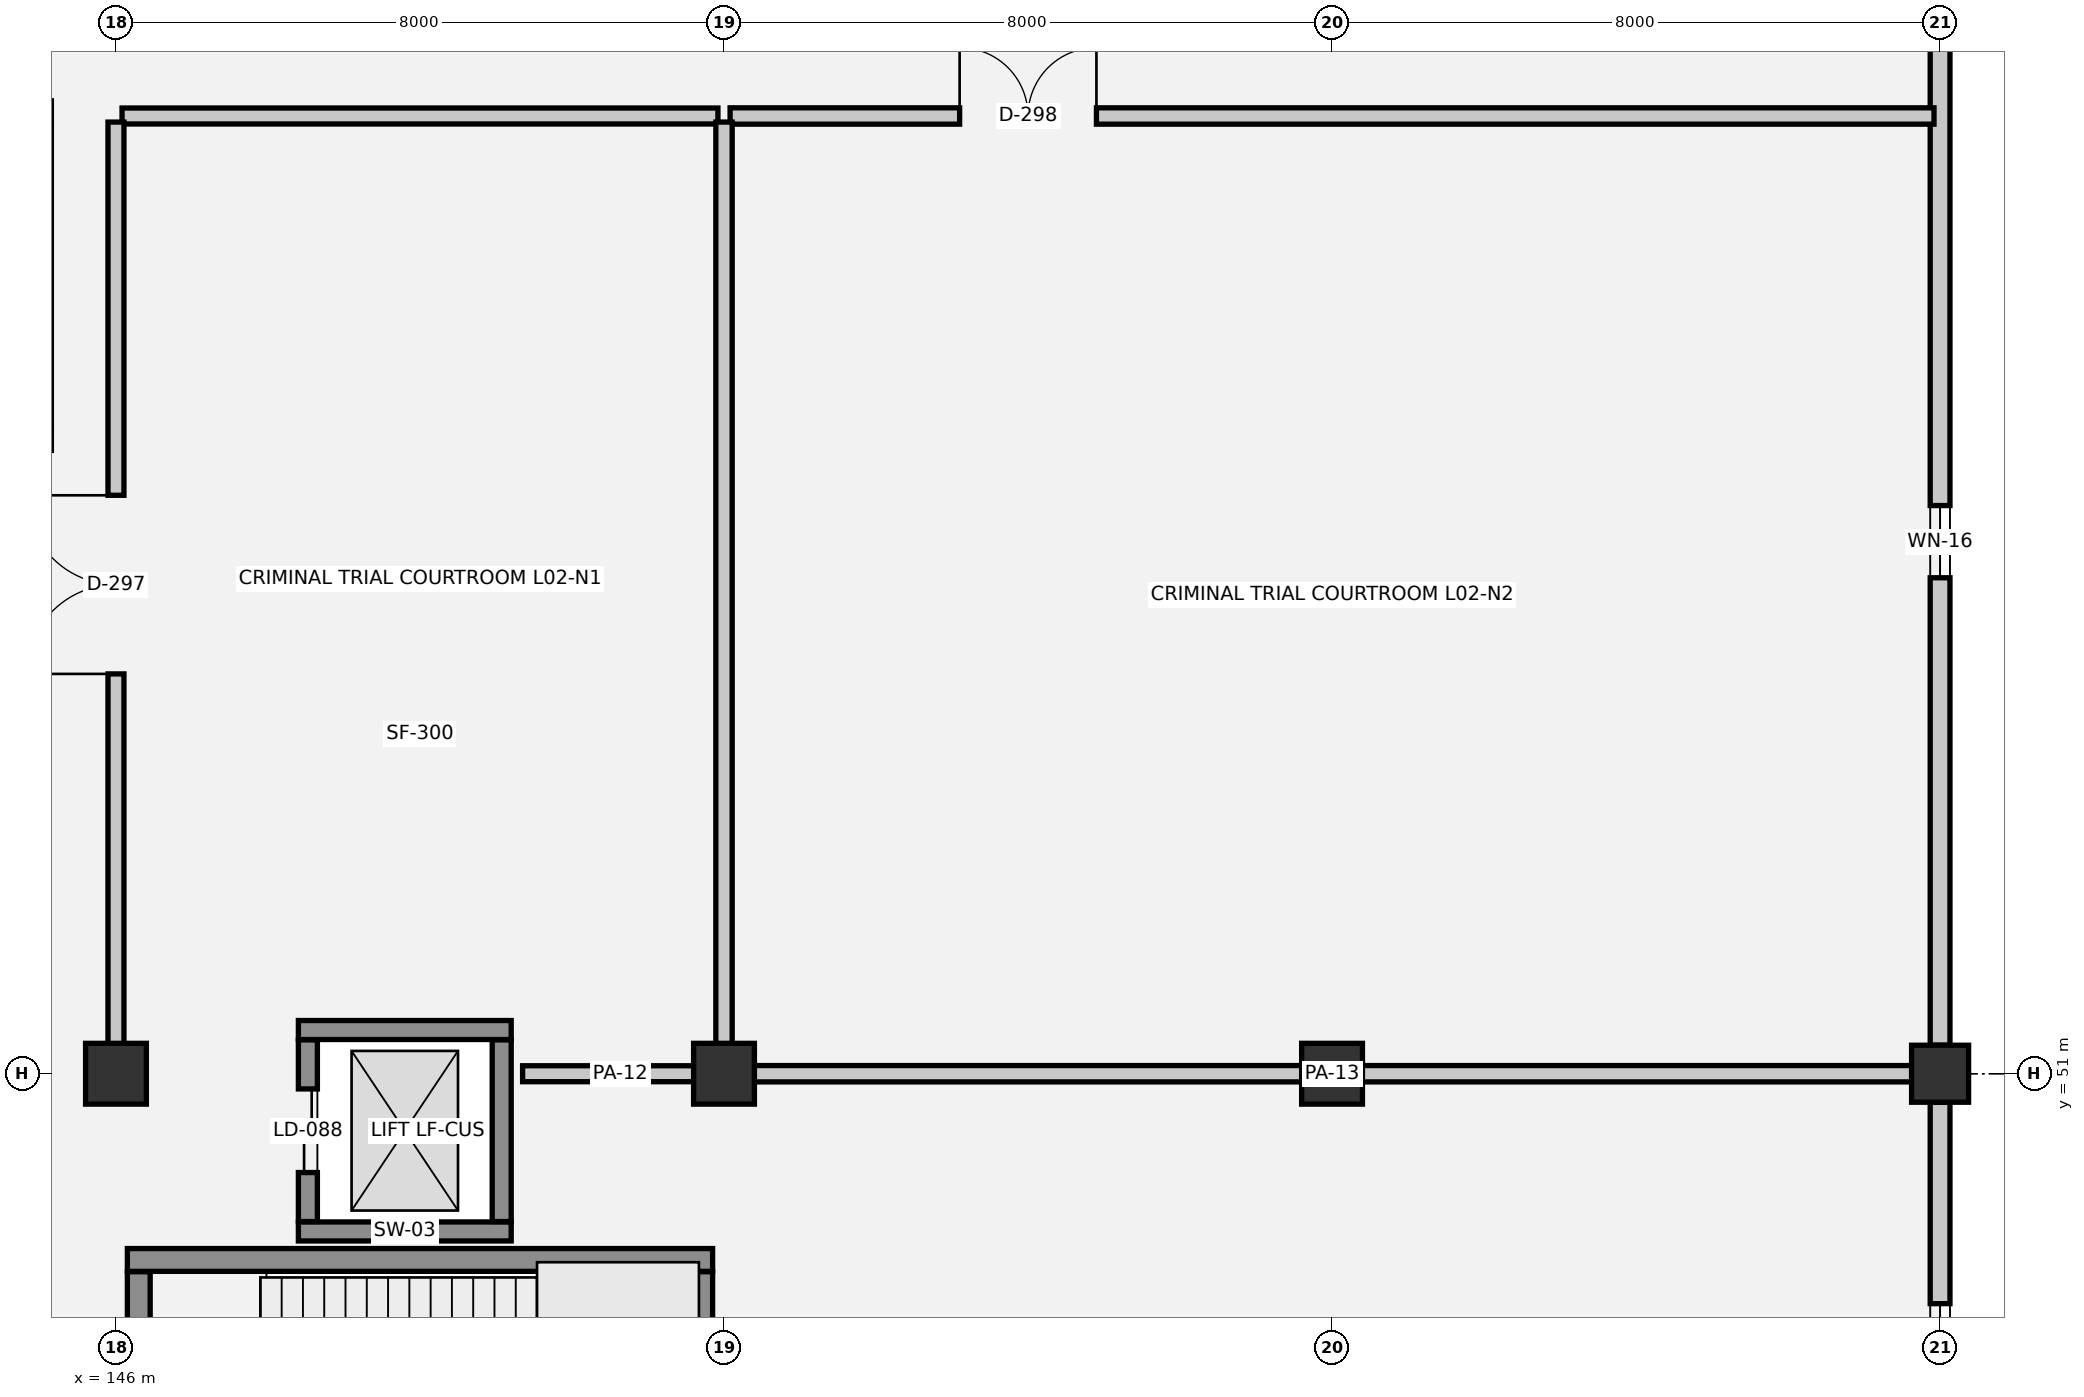
"""IFC4 building model, lengths in metres.
Left out: names, types, materials, properties, quantities, classifications, styles, units other than length and angle.
Written with IfcOpenShell. Run it as: python <this file> out.ifc"""

import sys

from ifc_helpers import new_model, si_unit, direction, frame, frame_2d, origin, origin_2d, place, context, subcontext, project, spatial, rectangle, extrude, element, fill, save


model = new_model("IFC4")
c1 = context("Model", 3, precision=1e-05, world=origin(), true_north=direction((0.0, 1.0)))
c2 = subcontext(c1, "Body", "Model", "MODEL_VIEW")
j1 = project(units=[si_unit("LENGTHUNIT", "METRE"), si_unit("PLANEANGLEUNIT", "RADIAN")], contexts=[c1])
p1 = place(None, origin())
s1 = spatial("IfcSite", under=j1, at=p1, CompositionType="ELEMENT")
p2 = place(p1, origin())
s2 = spatial("IfcBuilding", under=s1, at=p2, CompositionType="ELEMENT")
p3 = place(p2, frame((0.0, 0.0, 5.4)))
s3 = spatial("IfcBuildingStorey", under=s2, at=p3, CompositionType="ELEMENT", Elevation=5.4)
for number, where, z_axis, x_axis in (
    (1, (146.0, 51.0, 0.0), (0.0, 0.0, 1.0), (1.0, 0.0, 0.0)),
    (2, (154.0, 51.0, 0.0), (0.0, 0.0, 1.0), (1.0, 0.0, 0.0)),
    (3, (162.0, 51.0, 0.0), (0.0, 0.0, 1.0), (1.0, 0.0, 0.0)),
):
    element("IfcColumn", number, at=place(p3, frame(where, z_axis=z_axis, x_axis=x_axis)), inside=s3, PredefinedType="COLUMN", context=c2, shape_type="SweptSolid", body=[
        extrude(rectangle(XDim=0.8, YDim=0.8, at=origin_2d()), origin(), (0.0, 0.0, 1.0), 4.5),
    ])
p4 = place(p3, frame((170.0, 51.0, 0.0), z_axis=(0.0, 0.0, 1.0), x_axis=(1.0, 0.0, 0.0)))
e4 = element("IfcColumn", 4, at=p4, inside=s3, PredefinedType="COLUMN", context=c2, shape_type="SweptSolid", body=[
    extrude(rectangle(XDim=0.75, YDim=0.75, at=origin_2d()), origin(), (0.0, 0.0, 1.0), 4.5),
])
p5 = place(p3, frame((170.0, 64.625, 0.0), z_axis=(0.0, 0.0, 1.0), x_axis=(0.0, -1.0, 0.0)))
e5 = element("IfcWall", 5, at=p5, inside=s3, PredefinedType="SOLIDWALL", context=c2, shape_type="SweptSolid", body=[
    extrude(rectangle(XDim=13.25, YDim=0.26, at=frame_2d((6.625, 0.0))), origin(), (0.0, 0.0, 1.0), 3.23),
])
p6 = place(p5, frame((6.15, 0.0, 1.0)))
e6 = element("IfcOpeningElement", 6, at=p6, cuts=e5, PredefinedType="OPENING", context=c2, shape_type="SweptSolid", body=[
    extrude(rectangle(XDim=0.95, YDim=1.1, at=frame_2d((0.475, 0.55))), frame((0.0, 0.14, 0.0), z_axis=(0.0, -1.0, 0.0), x_axis=(1.0, 0.0, 0.0)), (0.0, 0.0, 1.0), 0.28),
])
p7 = place(p3, frame((170.0, 50.625, 0.0), z_axis=(0.0, 0.0, 1.0), x_axis=(0.0, -1.0, 0.0)))
e7 = element("IfcWall", 7, at=p7, inside=s3, PredefinedType="SOLIDWALL", context=c2, shape_type="SweptSolid", body=[
    extrude(rectangle(XDim=6.25, YDim=0.26, at=frame_2d((3.125, 0.0))), origin(), (0.0, 0.0, 1.0), 3.23),
])
p8 = place(p7, frame((2.65, 0.0, 1.0)))
e8 = element("IfcOpeningElement", 8, at=p8, cuts=e7, PredefinedType="OPENING", context=c2, shape_type="SweptSolid", body=[
    extrude(rectangle(XDim=0.95, YDim=1.1, at=frame_2d((0.475, 0.55))), frame((0.0, 0.14, 0.0), z_axis=(0.0, -1.0, 0.0), x_axis=(1.0, 0.0, 0.0)), (0.0, 0.0, 1.0), 0.28),
])
for number, where, z_axis, x_axis in (
    (9, (148.4, 48.925, 0.0), (0.0, 0.0, 1.0), (1.0, 0.0, 0.0)),
    (10, (151.2, 51.575, 0.0), (0.0, 0.0, 1.0), (-1.0, 0.0, 0.0)),
):
    element("IfcWall", number, at=place(p3, frame(where, z_axis=z_axis, x_axis=x_axis)), inside=s3, PredefinedType="SHEAR", context=c2, shape_type="SweptSolid", body=[
        extrude(rectangle(XDim=2.8, YDim=0.25, at=frame_2d((1.4, 0.0))), origin(), (0.0, 0.0, 1.0), 4.5),
    ])
p9 = place(p3, frame((148.525, 51.445, 0.0), z_axis=(0.0, 0.0, 1.0), x_axis=(0.0, -1.0, 0.0)))
e11 = element("IfcWall", 11, at=p9, inside=s3, PredefinedType="SHEAR", context=c2, shape_type="SweptSolid", body=[
    extrude(rectangle(XDim=2.39, YDim=0.25, at=frame_2d((1.195, 0.0))), origin(), (0.0, 0.0, 1.0), 4.5),
])
p10 = place(p9, frame((0.645, 0.0, 0.0)))
e12 = element("IfcOpeningElement", 12, at=p10, cuts=e11, PredefinedType="OPENING", context=c2, shape_type="SweptSolid", body=[
    extrude(rectangle(XDim=1.1, YDim=2.15, at=frame_2d((0.55, 1.075))), frame((0.0, 0.135, 0.0), z_axis=(0.0, -1.0, 0.0), x_axis=(1.0, 0.0, 0.0)), (0.0, 0.0, 1.0), 0.27),
])
p11 = place(p3, frame((151.075, 49.055, 0.0), z_axis=(0.0, 0.0, 1.0), x_axis=(0.0, 1.0, 0.0)))
e13 = element("IfcWall", 13, at=p11, inside=s3, PredefinedType="SHEAR", context=c2, shape_type="SweptSolid", body=[
    extrude(rectangle(XDim=2.39, YDim=0.25, at=frame_2d((1.195, 0.0))), origin(), (0.0, 0.0, 1.0), 4.5),
])
p12 = place(p3, frame((153.85, 48.55, 0.0), z_axis=(0.0, 0.0, 1.0), x_axis=(-1.0, 0.0, 0.0)))
e14 = element("IfcWall", 14, at=p12, inside=s3, PredefinedType="SHEAR", context=c2, shape_type="SweptSolid", body=[
    extrude(rectangle(XDim=7.7, YDim=0.3, at=frame_2d((3.85, 0.0))), origin(), (0.0, 0.0, 1.0), 4.2),
])
p13 = place(p3, frame((146.3, 48.395, 0.0), z_axis=(0.0, 0.0, 1.0), x_axis=(0.0, -1.0, 0.0)))
e15 = element("IfcWall", 15, at=p13, inside=s3, PredefinedType="SHEAR", context=c2, shape_type="SweptSolid", body=[
    extrude(rectangle(XDim=3.99, YDim=0.3, at=frame_2d((1.995, 0.0))), origin(), (0.0, 0.0, 1.0), 4.2),
])
p14 = place(p13, frame((1.37, 0.0, 0.0)))
e16 = element("IfcOpeningElement", 16, at=p14, cuts=e15, PredefinedType="OPENING", context=c2, shape_type="SweptSolid", body=[
    extrude(rectangle(XDim=1.25, YDim=2.15, at=frame_2d((0.625, 1.075))), frame((0.0, 0.16, 0.0), z_axis=(0.0, -1.0, 0.0), x_axis=(1.0, 0.0, 0.0)), (0.0, 0.0, 1.0), 0.32),
])
p15 = place(p3, frame((153.7, 44.405, 0.0), z_axis=(0.0, 0.0, 1.0), x_axis=(0.0, 1.0, 0.0)))
e17 = element("IfcWall", 17, at=p15, inside=s3, PredefinedType="SHEAR", context=c2, shape_type="SweptSolid", body=[
    extrude(rectangle(XDim=3.99, YDim=0.3, at=frame_2d((1.995, 0.0))), origin(), (0.0, 0.0, 1.0), 4.2),
])
p16 = place(p3, frame((151.35, 51.0, 0.0), z_axis=(0.0, 0.0, 1.0), x_axis=(1.0, 0.0, 0.0)))
e18 = element("IfcWall", 18, at=p16, inside=s3, PredefinedType="PARTITIONING", context=c2, shape_type="SweptSolid", body=[
    extrude(rectangle(XDim=2.57, YDim=0.21, at=frame_2d((1.285, 0.0))), origin(), (0.0, 0.0, 1.0), 3.45),
])
p17 = place(p3, frame((154.08, 51.0, 0.0), z_axis=(0.0, 0.0, 1.0), x_axis=(1.0, 0.0, 0.0)))
e19 = element("IfcWall", 19, at=p17, inside=s3, PredefinedType="PARTITIONING", context=c2, shape_type="SweptSolid", body=[
    extrude(rectangle(XDim=15.84, YDim=0.215, at=frame_2d((7.92, 0.0))), origin(), (0.0, 0.0, 1.0), 3.45),
])
p18 = place(p3, frame((146.08, 63.6, 0.0), z_axis=(0.0, 0.0, 1.0), x_axis=(1.0, 0.0, 0.0)))
e20 = element("IfcWall", 20, at=p18, inside=s3, PredefinedType="PARTITIONING", context=c2, shape_type="SweptSolid", body=[
    extrude(rectangle(XDim=7.84, YDim=0.21, at=frame_2d((3.92, 0.0))), origin(), (0.0, 0.0, 1.0), 4.14),
])
p19 = place(p3, frame((154.08, 63.6, 0.0), z_axis=(0.0, 0.0, 1.0), x_axis=(1.0, 0.0, 0.0)))
e21 = element("IfcWall", 21, at=p19, inside=s3, PredefinedType="PARTITIONING", context=c2, shape_type="SweptSolid", body=[
    extrude(rectangle(XDim=15.84, YDim=0.215, at=frame_2d((7.92, 0.0))), origin(), (0.0, 0.0, 1.0), 4.14),
])
p20 = place(p19, frame((3.02, 0.0, 0.0)))
e22 = element("IfcOpeningElement", 22, at=p20, cuts=e21, PredefinedType="OPENING", context=c2, shape_type="SweptSolid", body=[
    extrude(rectangle(XDim=1.8, YDim=2.3, at=frame_2d((0.9, 1.15))), frame((0.0, 0.117, 0.0), z_axis=(0.0, -1.0, 0.0), x_axis=(1.0, 0.0, 0.0)), (0.0, 0.0, 1.0), 0.235),
])
p21 = place(p3, frame((146.0, 51.35, 0.0), z_axis=(0.0, 0.0, 1.0), x_axis=(0.0, 1.0, 0.0)))
e23 = element("IfcWall", 23, at=p21, inside=s3, PredefinedType="PARTITIONING", context=c2, shape_type="SweptSolid", body=[
    extrude(rectangle(XDim=12.17, YDim=0.21, at=frame_2d((6.085, 0.0))), origin(), (0.0, 0.0, 1.0), 3.25),
])
p22 = place(p21, frame((4.91, 0.0, 0.0)))
e24 = element("IfcOpeningElement", 24, at=p22, cuts=e23, PredefinedType="OPENING", context=c2, shape_type="SweptSolid", body=[
    extrude(rectangle(XDim=2.35, YDim=2.4, at=frame_2d((1.175, 1.2))), frame((0.0, 0.115, 0.0), z_axis=(0.0, -1.0, 0.0), x_axis=(1.0, 0.0, 0.0)), (0.0, 0.0, 1.0), 0.23),
])
p23 = place(p3, frame((154.0, 51.08, 0.0), z_axis=(0.0, 0.0, 1.0), x_axis=(0.0, 1.0, 0.0)))
e25 = element("IfcWall", 25, at=p23, inside=s3, PredefinedType="PARTITIONING", context=c2, shape_type="SweptSolid", body=[
    extrude(rectangle(XDim=12.44, YDim=0.215, at=frame_2d((6.22, 0.0))), origin(), (0.0, 0.0, 1.0), 3.25),
])
p24 = place(p6, origin())
e26 = element("IfcWindow", 26, at=p24, inside=s3, PartitioningType="SINGLE_PANEL", PredefinedType="WINDOW", context=c2, shape_type="SweptSolid", body=[
    extrude(rectangle(XDim=0.95, YDim=1.1, at=frame_2d((0.475, 0.55))), frame((0.0, 0.03, 0.0), z_axis=(0.0, -1.0, 0.0), x_axis=(1.0, 0.0, 0.0)), (0.0, 0.0, 1.0), 0.06),
])
fill(e6, e26)
p25 = place(p8, origin())
e27 = element("IfcWindow", 27, at=p25, inside=s3, PartitioningType="SINGLE_PANEL", PredefinedType="WINDOW", context=c2, shape_type="SweptSolid", body=[
    extrude(rectangle(XDim=0.95, YDim=1.1, at=frame_2d((0.475, 0.55))), frame((0.0, 0.03, 0.0), z_axis=(0.0, -1.0, 0.0), x_axis=(1.0, 0.0, 0.0)), (0.0, 0.0, 1.0), 0.06),
])
fill(e8, e27)
p26 = place(p10, origin())
e28 = element("IfcDoor", 28, at=p26, inside=s3, OperationType="DOUBLE_DOOR_SLIDING", PredefinedType="DOOR", context=c2, shape_type="SweptSolid", body=[
    extrude(rectangle(XDim=1.1, YDim=2.15, at=frame_2d((0.55, 1.075))), frame((0.0, 0.025, 0.0), z_axis=(0.0, -1.0, 0.0), x_axis=(1.0, 0.0, 0.0)), (0.0, 0.0, 1.0), 0.05),
])
fill(e12, e28)
p27 = place(p22, origin())
e29 = element("IfcDoor", 29, at=p27, inside=s3, OperationType="DOUBLE_DOOR_SINGLE_SWING", PredefinedType="DOOR", context=c2, shape_type="SweptSolid", body=[
    extrude(rectangle(XDim=2.35, YDim=2.4, at=frame_2d((1.175, 1.2))), frame((0.0, 0.025, 0.0), z_axis=(0.0, -1.0, 0.0), x_axis=(1.0, 0.0, 0.0)), (0.0, 0.0, 1.0), 0.05),
])
fill(e24, e29)
p28 = place(p20, origin())
e30 = element("IfcDoor", 30, at=p28, inside=s3, OperationType="DOUBLE_DOOR_SINGLE_SWING", PredefinedType="DOOR", context=c2, shape_type="SweptSolid", body=[
    extrude(rectangle(XDim=1.8, YDim=2.3, at=frame_2d((0.9, 1.15))), frame((0.0, 0.025, 0.0), z_axis=(0.0, -1.0, 0.0), x_axis=(1.0, 0.0, 0.0)), (0.0, 0.0, 1.0), 0.05),
])
fill(e22, e30)
save(model, sys.argv[1])
